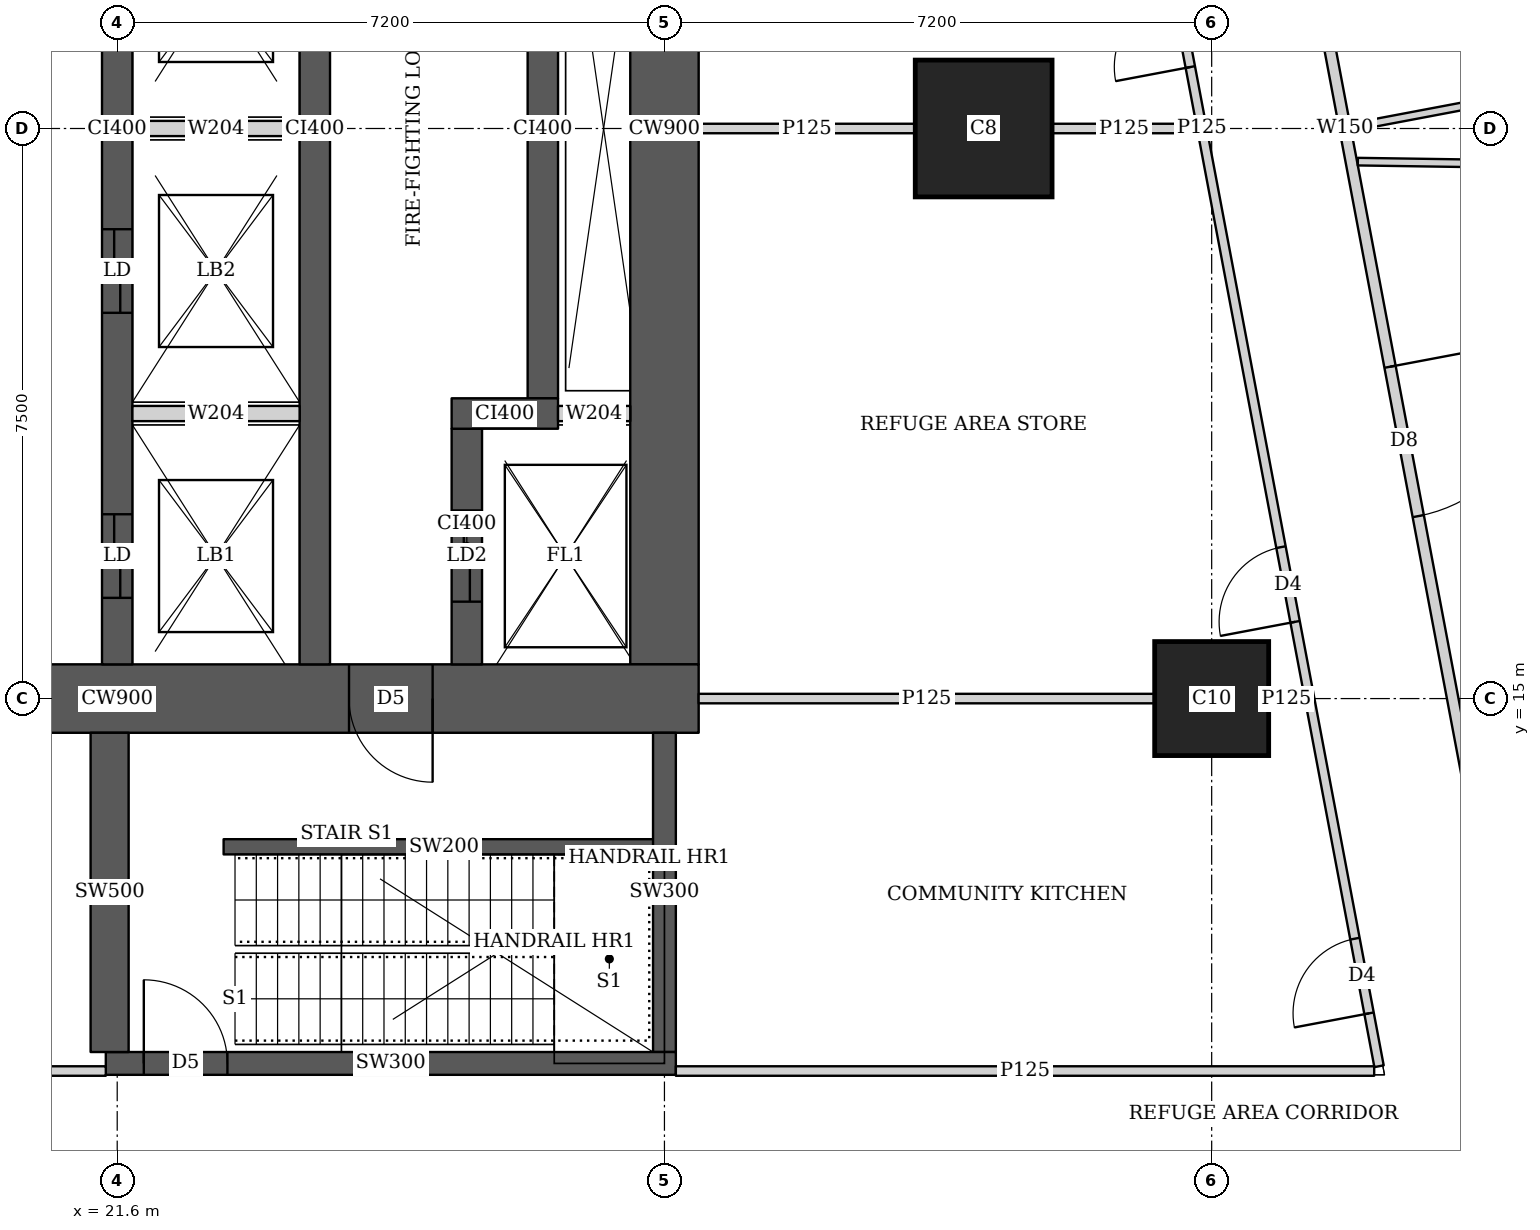
"""IFC4 building model, lengths in metres.
Left out: names, types, materials, properties, quantities, classifications, styles, units other than length and angle.
Written with IfcOpenShell. Run it as: python <this file> out.ifc"""

import sys

from ifc_helpers import new_model, si_unit, direction, frame, frame_2d, origin, origin_2d, place, context, subcontext, project, spatial, rectangle, extrude, element, fill, save


model = new_model("IFC4")
c1 = context("Model", 3, precision=1e-05, world=origin(), true_north=direction((0.0, 1.0)))
c2 = subcontext(c1, "Body", "Model", "MODEL_VIEW")
j1 = project(units=[si_unit("LENGTHUNIT", "METRE"), si_unit("PLANEANGLEUNIT", "RADIAN")], contexts=[c1])
p1 = place(None, origin())
s1 = spatial("IfcSite", under=j1, at=p1, CompositionType="ELEMENT")
p2 = place(p1, origin())
s2 = spatial("IfcBuilding", under=s1, at=p2, CompositionType="ELEMENT")
p3 = place(p2, frame((0.0, 0.0, 188.3)))
s3 = spatial("IfcBuildingStorey", under=s2, at=p3, CompositionType="ELEMENT", Elevation=188.3)
p4 = place(p3, frame((36.0, 15.0, 0.0), z_axis=(0.0, 0.0, 1.0), x_axis=(1.0, 0.0, 0.0)))
e1 = element("IfcColumn", 1, at=p4, inside=s3, PredefinedType="COLUMN", context=c2, shape_type="SweptSolid", body=[
    extrude(rectangle(XDim=1.5, YDim=1.5, at=origin_2d()), origin(), (0.0, 0.0, 1.0), 5.4),
])
p5 = place(p3, frame((33.0, 22.5, 0.0), z_axis=(0.0, 0.0, 1.0), x_axis=(1.0, 0.0, 0.0)))
e2 = element("IfcColumn", 2, at=p5, inside=s3, PredefinedType="COLUMN", context=c2, shape_type="SweptSolid", body=[
    extrude(rectangle(XDim=1.8, YDim=1.8, at=origin_2d()), origin(), (0.0, 0.0, 1.0), 5.4),
])
p6 = place(p3, frame((13.95, 15.0, 0.0), z_axis=(0.0, 0.0, 1.0), x_axis=(1.0, 0.0, 0.0)))
e3 = element("IfcWall", 3, at=p6, inside=s3, PredefinedType="SHEAR", context=c2, shape_type="SweptSolid", body=[
    extrude(rectangle(XDim=15.3, YDim=0.9, at=frame_2d((7.65, 0.0))), origin(), (0.0, 0.0, 1.0), 5.4),
])
p7 = place(p6, frame((4.45, 0.0, 0.0)))
e4 = element("IfcOpeningElement", 4, at=p7, cuts=e3, PredefinedType="OPENING", context=c2, shape_type="SweptSolid", body=[
    extrude(rectangle(XDim=1.8, YDim=2.1, at=frame_2d((0.9, 1.05))), frame((0.0, 0.46, 0.0), z_axis=(0.0, -1.0, 0.0), x_axis=(1.0, 0.0, 0.0)), (0.0, 0.0, 1.0), 0.92),
])
p8 = place(p6, frame((10.7, 0.0, 0.0)))
e5 = element("IfcOpeningElement", 5, at=p8, cuts=e3, PredefinedType="OPENING", context=c2, shape_type="SweptSolid", body=[
    extrude(rectangle(XDim=1.1, YDim=2.1, at=frame_2d((0.55, 1.05))), frame((0.0, 0.46, 0.0), z_axis=(0.0, -1.0, 0.0), x_axis=(1.0, 0.0, 0.0)), (0.0, 0.0, 1.0), 0.92),
])
p9 = place(p3, frame((28.8, 15.45, 0.0), z_axis=(0.0, 0.0, 1.0), x_axis=(0.0, 1.0, 0.0)))
e6 = element("IfcWall", 6, at=p9, inside=s3, PredefinedType="SHEAR", context=c2, shape_type="SweptSolid", body=[
    extrude(rectangle(XDim=14.1, YDim=0.9, at=frame_2d((7.05, 0.0))), origin(), (0.0, 0.0, 1.0), 5.4),
])
p10 = place(p3, frame((21.6, 15.45, 0.0), z_axis=(0.0, 0.0, 1.0), x_axis=(0.0, 1.0, 0.0)))
e7 = element("IfcWall", 7, at=p10, inside=s3, PredefinedType="SHEAR", context=c2, shape_type="SweptSolid", body=[
    extrude(rectangle(XDim=14.1, YDim=0.4, at=frame_2d((7.05, 0.0))), origin(), (0.0, 0.0, 1.0), 5.4),
])
p11 = place(p10, frame((0.875, 0.0, 0.0)))
e8 = element("IfcOpeningElement", 8, at=p11, cuts=e7, PredefinedType="OPENING", context=c2, shape_type="SweptSolid", body=[
    extrude(rectangle(XDim=1.1, YDim=2.1, at=frame_2d((0.55, 1.05))), frame((0.0, 0.21, 0.0), z_axis=(0.0, -1.0, 0.0), x_axis=(1.0, 0.0, 0.0)), (0.0, 0.0, 1.0), 0.42),
])
p12 = place(p10, frame((4.625, 0.0, 0.0)))
e9 = element("IfcOpeningElement", 9, at=p12, cuts=e7, PredefinedType="OPENING", context=c2, shape_type="SweptSolid", body=[
    extrude(rectangle(XDim=1.1, YDim=2.1, at=frame_2d((0.55, 1.05))), frame((0.0, 0.21, 0.0), z_axis=(0.0, -1.0, 0.0), x_axis=(1.0, 0.0, 0.0)), (0.0, 0.0, 1.0), 0.42),
])
p13 = place(p10, frame((8.375, 0.0, 0.0)))
e10 = element("IfcOpeningElement", 10, at=p13, cuts=e7, PredefinedType="OPENING", context=c2, shape_type="SweptSolid", body=[
    extrude(rectangle(XDim=1.1, YDim=2.1, at=frame_2d((0.55, 1.05))), frame((0.0, 0.21, 0.0), z_axis=(0.0, -1.0, 0.0), x_axis=(1.0, 0.0, 0.0)), (0.0, 0.0, 1.0), 0.42),
])
p14 = place(p10, frame((12.125, 0.0, 0.0)))
e11 = element("IfcOpeningElement", 11, at=p14, cuts=e7, PredefinedType="OPENING", context=c2, shape_type="SweptSolid", body=[
    extrude(rectangle(XDim=1.1, YDim=2.1, at=frame_2d((0.55, 1.05))), frame((0.0, 0.21, 0.0), z_axis=(0.0, -1.0, 0.0), x_axis=(1.0, 0.0, 0.0)), (0.0, 0.0, 1.0), 0.42),
])
p15 = place(p3, frame((24.2, 15.45, 0.0), z_axis=(0.0, 0.0, 1.0), x_axis=(0.0, 1.0, 0.0)))
e12 = element("IfcWall", 12, at=p15, inside=s3, PredefinedType="SHEAR", context=c2, shape_type="SweptSolid", body=[
    extrude(rectangle(XDim=14.1, YDim=0.4, at=frame_2d((7.05, 0.0))), origin(), (0.0, 0.0, 1.0), 5.4),
])
p16 = place(p3, frame((26.2, 15.45, 0.0), z_axis=(0.0, 0.0, 1.0), x_axis=(0.0, 1.0, 0.0)))
e13 = element("IfcWall", 13, at=p16, inside=s3, PredefinedType="SHEAR", context=c2, shape_type="SweptSolid", body=[
    extrude(rectangle(XDim=3.1, YDim=0.4, at=frame_2d((1.55, 0.0))), origin(), (0.0, 0.0, 1.0), 5.4),
])
p17 = place(p16, frame((0.825, 0.0, 0.0)))
e14 = element("IfcOpeningElement", 14, at=p17, cuts=e13, PredefinedType="OPENING", context=c2, shape_type="SweptSolid", body=[
    extrude(rectangle(XDim=1.2, YDim=2.1, at=frame_2d((0.6, 1.05))), frame((0.0, 0.21, 0.0), z_axis=(0.0, -1.0, 0.0), x_axis=(1.0, 0.0, 0.0)), (0.0, 0.0, 1.0), 0.42),
])
p18 = place(p3, frame((26.0, 18.75, 0.0), z_axis=(0.0, 0.0, 1.0), x_axis=(1.0, 0.0, 0.0)))
e15 = element("IfcWall", 15, at=p18, inside=s3, PredefinedType="SHEAR", context=c2, shape_type="SweptSolid", body=[
    extrude(rectangle(XDim=1.4, YDim=0.4, at=frame_2d((0.7, 0.0))), origin(), (0.0, 0.0, 1.0), 5.4),
])
p19 = place(p3, frame((27.2, 18.95, 0.0), z_axis=(0.0, 0.0, 1.0), x_axis=(0.0, 1.0, 0.0)))
e16 = element("IfcWall", 16, at=p19, inside=s3, PredefinedType="SHEAR", context=c2, shape_type="SweptSolid", body=[
    extrude(rectangle(XDim=7.1, YDim=0.4, at=frame_2d((3.55, 0.0))), origin(), (0.0, 0.0, 1.0), 5.4),
])
p20 = place(p3, frame((21.45, 10.2, 0.0), z_axis=(0.0, 0.0, 1.0), x_axis=(1.0, 0.0, 0.0)))
e17 = element("IfcWall", 17, at=p20, inside=s3, PredefinedType="SHEAR", context=c2, shape_type="SweptSolid", body=[
    extrude(rectangle(XDim=7.5, YDim=0.3, at=frame_2d((3.75, 0.0))), origin(), (0.0, 0.0, 1.0), 5.4),
])
p21 = place(p20, frame((0.5, 0.0, 0.0)))
e18 = element("IfcOpeningElement", 18, at=p21, cuts=e17, PredefinedType="OPENING", context=c2, shape_type="SweptSolid", body=[
    extrude(rectangle(XDim=1.1, YDim=2.1, at=frame_2d((0.55, 1.05))), frame((0.0, 0.16, 0.0), z_axis=(0.0, -1.0, 0.0), x_axis=(1.0, 0.0, 0.0)), (0.0, 0.0, 1.0), 0.32),
])
p22 = place(p3, frame((21.5, 10.35, 0.0), z_axis=(0.0, 0.0, 1.0), x_axis=(0.0, 1.0, 0.0)))
e19 = element("IfcWall", 19, at=p22, inside=s3, PredefinedType="SHEAR", context=c2, shape_type="SweptSolid", body=[
    extrude(rectangle(XDim=4.2, YDim=0.5, at=frame_2d((2.1, 0.0))), origin(), (0.0, 0.0, 1.0), 5.4),
])
p23 = place(p3, frame((28.8, 10.35, 0.0), z_axis=(0.0, 0.0, 1.0), x_axis=(0.0, 1.0, 0.0)))
e20 = element("IfcWall", 20, at=p23, inside=s3, PredefinedType="SHEAR", context=c2, shape_type="SweptSolid", body=[
    extrude(rectangle(XDim=4.2, YDim=0.3, at=frame_2d((2.1, 0.0))), origin(), (0.0, 0.0, 1.0), 5.4),
])
p24 = place(p3, frame((33.384, 45.638, 0.0), z_axis=(0.0, 0.0, 1.0), x_axis=(0.185609889355, -0.982623513342, 0.0)))
e21 = element("IfcWall", 21, at=p24, inside=s3, PredefinedType="SOLIDWALL", context=c2, shape_type="SweptSolid", body=[
    extrude(rectangle(XDim=47.093, YDim=0.15, at=frame_2d((23.547, 0.0))), origin(), (0.0, 0.0, 1.0), 3.35),
])
p25 = place(p24, frame((11.166, 0.0, 0.0)))
e22 = element("IfcOpeningElement", 22, at=p25, cuts=e21, PredefinedType="OPENING", context=c2, shape_type="SweptSolid", body=[
    extrude(rectangle(XDim=1.0, YDim=2.1, at=frame_2d((0.5, 1.05))), frame((0.0, 0.085, 0.0), z_axis=(0.0, -1.0, 0.0), x_axis=(1.0, 0.0, 0.0)), (0.0, 0.0, 1.0), 0.17),
])
p26 = place(p24, frame((26.737, 0.0, 0.0)))
e23 = element("IfcOpeningElement", 23, at=p26, cuts=e21, PredefinedType="OPENING", context=c2, shape_type="SweptSolid", body=[
    extrude(rectangle(XDim=2.0, YDim=2.1, at=frame_2d((1.0, 1.05))), frame((0.0, 0.085, 0.0), z_axis=(0.0, -1.0, 0.0), x_axis=(1.0, 0.0, 0.0)), (0.0, 0.0, 1.0), 0.17),
])
p27 = place(p24, frame((34.058, 0.0, 0.0)))
e24 = element("IfcOpeningElement", 24, at=p27, cuts=e21, PredefinedType="OPENING", context=c2, shape_type="SweptSolid", body=[
    extrude(rectangle(XDim=2.0, YDim=2.1, at=frame_2d((1.0, 1.05))), frame((0.0, 0.085, 0.0), z_axis=(0.0, -1.0, 0.0), x_axis=(1.0, 0.0, 0.0)), (0.0, 0.0, 1.0), 0.17),
])
p28 = place(p3, frame((42.887, 23.47, 0.0), z_axis=(0.0, 0.0, 1.0), x_axis=(-0.982608146753, -0.185691222019, 0.0)))
e25 = element("IfcWall", 25, at=p28, inside=s3, PredefinedType="PARTITIONING", context=c2, shape_type="SweptSolid", body=[
    extrude(rectangle(XDim=5.149, YDim=0.1, at=frame_2d((2.574, 0.0))), origin(), (0.0, 0.0, 1.0), 3.55),
])
p29 = place(p3, frame((10.163, 10.1, 0.0), z_axis=(0.0, 0.0, 1.0), x_axis=(1.0, 0.0, 0.0)))
e26 = element("IfcWall", 26, at=p29, inside=s3, PredefinedType="PARTITIONING", context=c2, shape_type="SweptSolid", body=[
    extrude(rectangle(XDim=11.287, YDim=0.125, at=frame_2d((5.644, 0.0))), origin(), (0.0, 0.0, 1.0), 3.15),
])
p30 = place(p29, frame((7.832, 0.0, 0.0)))
e27 = element("IfcOpeningElement", 27, at=p30, cuts=e26, PredefinedType="OPENING", context=c2, shape_type="SweptSolid", body=[
    extrude(rectangle(XDim=1.8, YDim=2.1, at=frame_2d((0.9, 1.05))), frame((0.0, 0.073, 0.0), z_axis=(0.0, -1.0, 0.0), x_axis=(1.0, 0.0, 0.0)), (0.0, 0.0, 1.0), 0.145),
])
p31 = place(p3, frame((28.95, 10.1, 0.0), z_axis=(0.0, 0.0, 1.0), x_axis=(1.0, 0.0, 0.0)))
e28 = element("IfcWall", 28, at=p31, inside=s3, PredefinedType="PARTITIONING", context=c2, shape_type="SweptSolid", body=[
    extrude(rectangle(XDim=9.188, YDim=0.125, at=frame_2d((4.594, 0.0))), origin(), (0.0, 0.0, 1.0), 3.15),
])
p32 = place(p3, frame((38.202, 10.163, 0.0), z_axis=(0.0, 0.0, 1.0), x_axis=(-0.185610321132, 0.982623431783, 0.0)))
e29 = element("IfcWall", 29, at=p32, inside=s3, PredefinedType="PARTITIONING", context=c2, shape_type="SweptSolid", body=[
    extrude(rectangle(XDim=25.111, YDim=0.125, at=frame_2d((12.556, 0.0))), origin(), (0.0, 0.0, 1.0), 3.55),
])
p33 = place(p32, frame((0.708, 0.0, 0.0)))
e30 = element("IfcOpeningElement", 30, at=p33, cuts=e29, PredefinedType="OPENING", context=c2, shape_type="SweptSolid", body=[
    extrude(rectangle(XDim=1.0, YDim=2.1, at=frame_2d((0.5, 1.05))), frame((0.0, 0.073, 0.0), z_axis=(0.0, -1.0, 0.0), x_axis=(1.0, 0.0, 0.0)), (0.0, 0.0, 1.0), 0.145),
])
p34 = place(p32, frame((5.95, 0.0, 0.0)))
e31 = element("IfcOpeningElement", 31, at=p34, cuts=e29, PredefinedType="OPENING", context=c2, shape_type="SweptSolid", body=[
    extrude(rectangle(XDim=1.0, YDim=2.1, at=frame_2d((0.5, 1.05))), frame((0.0, 0.073, 0.0), z_axis=(0.0, -1.0, 0.0), x_axis=(1.0, 0.0, 0.0)), (0.0, 0.0, 1.0), 0.145),
])
p35 = place(p32, frame((13.378, 0.0, 0.0)))
e32 = element("IfcOpeningElement", 32, at=p35, cuts=e29, PredefinedType="OPENING", context=c2, shape_type="SweptSolid", body=[
    extrude(rectangle(XDim=1.0, YDim=2.1, at=frame_2d((0.5, 1.05))), frame((0.0, 0.073, 0.0), z_axis=(0.0, -1.0, 0.0), x_axis=(1.0, 0.0, 0.0)), (0.0, 0.0, 1.0), 0.145),
])
p36 = place(p32, frame((21.2, 0.0, 0.0)))
e33 = element("IfcOpeningElement", 33, at=p36, cuts=e29, PredefinedType="OPENING", context=c2, shape_type="SweptSolid", body=[
    extrude(rectangle(XDim=1.0, YDim=2.1, at=frame_2d((0.5, 1.05))), frame((0.0, 0.073, 0.0), z_axis=(0.0, -1.0, 0.0), x_axis=(1.0, 0.0, 0.0)), (0.0, 0.0, 1.0), 0.145),
])
p37 = place(p3, frame((29.25, 15.0, 0.0), z_axis=(0.0, 0.0, 1.0), x_axis=(1.0, 0.0, 0.0)))
e34 = element("IfcWall", 34, at=p37, inside=s3, PredefinedType="PARTITIONING", context=c2, shape_type="SweptSolid", body=[
    extrude(rectangle(XDim=5.999, YDim=0.125, at=frame_2d((3.0, 0.0))), origin(), (0.0, 0.0, 1.0), 3.55),
])
p38 = place(p3, frame((36.751, 15.0, 0.0), z_axis=(0.0, 0.0, 1.0), x_axis=(1.0, 0.0, 0.0)))
e35 = element("IfcWall", 35, at=p38, inside=s3, PredefinedType="PARTITIONING", context=c2, shape_type="SweptSolid", body=[
    extrude(rectangle(XDim=0.462, YDim=0.125, at=frame_2d((0.231, 0.0))), origin(), (0.0, 0.0, 1.0), 3.55),
])
p39 = place(p3, frame((29.25, 22.5, 0.0), z_axis=(0.0, 0.0, 1.0), x_axis=(1.0, 0.0, 0.0)))
e36 = element("IfcWall", 36, at=p39, inside=s3, PredefinedType="PARTITIONING", context=c2, shape_type="SweptSolid", body=[
    extrude(rectangle(XDim=2.849, YDim=0.125, at=frame_2d((1.425, 0.0))), origin(), (0.0, 0.0, 1.0), 3.55),
])
p40 = place(p3, frame((33.901, 22.5, 0.0), z_axis=(0.0, 0.0, 1.0), x_axis=(1.0, 0.0, 0.0)))
e37 = element("IfcWall", 37, at=p40, inside=s3, PredefinedType="PARTITIONING", context=c2, shape_type="SweptSolid", body=[
    extrude(rectangle(XDim=1.895, YDim=0.125, at=frame_2d((0.948, 0.0))), origin(), (0.0, 0.0, 1.0), 3.55),
])
p41 = place(p3, frame((37.923, 22.064, 0.0), z_axis=(0.0, 0.0, 1.0), x_axis=(0.99989012089, -0.014823837076, 0.0)))
e38 = element("IfcWall", 38, at=p41, inside=s3, PredefinedType="PARTITIONING", context=c2, shape_type="SweptSolid", body=[
    extrude(rectangle(XDim=4.924, YDim=0.1, at=frame_2d((2.462, 0.0))), origin(), (0.0, 0.0, 1.0), 3.55),
])
p42 = place(p3, frame((23.0, 13.05, 0.0), z_axis=(0.0, 0.0, 1.0), x_axis=(1.0, 0.0, 0.0)))
e39 = element("IfcWall", 39, at=p42, inside=s3, PredefinedType="SHEAR", context=c2, shape_type="SweptSolid", body=[
    extrude(rectangle(XDim=5.8, YDim=0.2, at=frame_2d((2.9, 0.0))), origin(), (0.0, 0.0, 1.0), 5.4),
])
for number, where, z_axis, x_axis in (
    (40, (21.8, 18.75, 0.0), (0.0, 0.0, 1.0), (1.0, 0.0, 0.0)),
    (41, (21.8, 22.5, 0.0), (0.0, 0.0, 1.0), (1.0, 0.0, 0.0)),
):
    element("IfcWall", number, at=place(p3, frame(where, z_axis=z_axis, x_axis=x_axis)), inside=s3, PredefinedType="SOLIDWALL", context=c2, shape_type="SweptSolid", body=[
        extrude(rectangle(XDim=2.2, YDim=0.2, at=frame_2d((1.1, 0.0))), origin(), (0.0, 0.0, 1.0), 5.15),
    ])
p43 = place(p3, frame((27.4, 18.75, 0.0), z_axis=(0.0, 0.0, 1.0), x_axis=(1.0, 0.0, 0.0)))
e42 = element("IfcWall", 42, at=p43, inside=s3, PredefinedType="SOLIDWALL", context=c2, shape_type="SweptSolid", body=[
    extrude(rectangle(XDim=0.95, YDim=0.2, at=frame_2d((0.475, 0.0))), origin(), (0.0, 0.0, 1.0), 5.15),
])
p44 = place(p26, origin())
e43 = element("IfcDoor", 43, at=p44, inside=s3, OperationType="DOUBLE_DOOR_SINGLE_SWING", PredefinedType="DOOR", context=c2, shape_type="SweptSolid", body=[
    extrude(rectangle(XDim=2.0, YDim=2.1, at=frame_2d((1.0, 1.05))), frame((0.0, 0.025, 0.0), z_axis=(0.0, -1.0, 0.0), x_axis=(1.0, 0.0, 0.0)), (0.0, 0.0, 1.0), 0.05),
])
fill(e23, e43)
p45 = place(p33, origin())
e44 = element("IfcDoor", 44, at=p45, inside=s3, OperationType="SINGLE_SWING_LEFT", PredefinedType="DOOR", context=c2, shape_type="SweptSolid", body=[
    extrude(rectangle(XDim=1.0, YDim=2.1, at=frame_2d((0.5, 1.05))), frame((0.0, 0.025, 0.0), z_axis=(0.0, -1.0, 0.0), x_axis=(1.0, 0.0, 0.0)), (0.0, 0.0, 1.0), 0.05),
])
fill(e30, e44)
p46 = place(p34, origin())
e45 = element("IfcDoor", 45, at=p46, inside=s3, OperationType="SINGLE_SWING_LEFT", PredefinedType="DOOR", context=c2, shape_type="SweptSolid", body=[
    extrude(rectangle(XDim=1.0, YDim=2.1, at=frame_2d((0.5, 1.05))), frame((0.0, 0.025, 0.0), z_axis=(0.0, -1.0, 0.0), x_axis=(1.0, 0.0, 0.0)), (0.0, 0.0, 1.0), 0.05),
])
fill(e31, e45)
p47 = place(p35, origin())
e46 = element("IfcDoor", 46, at=p47, inside=s3, OperationType="SINGLE_SWING_LEFT", PredefinedType="DOOR", context=c2, shape_type="SweptSolid", body=[
    extrude(rectangle(XDim=1.0, YDim=2.1, at=frame_2d((0.5, 1.05))), frame((0.0, 0.025, 0.0), z_axis=(0.0, -1.0, 0.0), x_axis=(1.0, 0.0, 0.0)), (0.0, 0.0, 1.0), 0.05),
])
fill(e32, e46)
p48 = place(p8, origin())
e47 = element("IfcDoor", 47, at=p48, inside=s3, OperationType="SINGLE_SWING_LEFT", PredefinedType="DOOR", context=c2, shape_type="SweptSolid", body=[
    extrude(rectangle(XDim=1.1, YDim=2.1, at=frame_2d((0.55, 1.05))), frame((0.0, 0.025, 0.0), z_axis=(0.0, -1.0, 0.0), x_axis=(1.0, 0.0, 0.0)), (0.0, 0.0, 1.0), 0.05),
])
fill(e5, e47)
p49 = place(p17, origin())
e48 = element("IfcDoor", 48, at=p49, inside=s3, OperationType="DOUBLE_DOOR_SLIDING", PredefinedType="DOOR", context=c2, shape_type="SweptSolid", body=[
    extrude(rectangle(XDim=1.2, YDim=2.1, at=frame_2d((0.6, 1.05))), frame((0.0, 0.025, 0.0), z_axis=(0.0, -1.0, 0.0), x_axis=(1.0, 0.0, 0.0)), (0.0, 0.0, 1.0), 0.05),
])
fill(e14, e48)
p50 = place(p11, origin())
e49 = element("IfcDoor", 49, at=p50, inside=s3, OperationType="DOUBLE_DOOR_SLIDING", PredefinedType="DOOR", context=c2, shape_type="SweptSolid", body=[
    extrude(rectangle(XDim=1.1, YDim=2.1, at=frame_2d((0.55, 1.05))), frame((0.0, 0.025, 0.0), z_axis=(0.0, -1.0, 0.0), x_axis=(1.0, 0.0, 0.0)), (0.0, 0.0, 1.0), 0.05),
])
fill(e8, e49)
p51 = place(p12, origin())
e50 = element("IfcDoor", 50, at=p51, inside=s3, OperationType="DOUBLE_DOOR_SLIDING", PredefinedType="DOOR", context=c2, shape_type="SweptSolid", body=[
    extrude(rectangle(XDim=1.1, YDim=2.1, at=frame_2d((0.55, 1.05))), frame((0.0, 0.025, 0.0), z_axis=(0.0, -1.0, 0.0), x_axis=(1.0, 0.0, 0.0)), (0.0, 0.0, 1.0), 0.05),
])
fill(e9, e50)
p52 = place(p21, origin())
e51 = element("IfcDoor", 51, at=p52, inside=s3, OperationType="SINGLE_SWING_LEFT", PredefinedType="DOOR", context=c2, shape_type="SweptSolid", body=[
    extrude(rectangle(XDim=1.1, YDim=2.1, at=frame_2d((0.55, 1.05))), frame((0.0, 0.025, 0.0), z_axis=(0.0, -1.0, 0.0), x_axis=(1.0, 0.0, 0.0)), (0.0, 0.0, 1.0), 0.05),
])
fill(e18, e51)
save(model, sys.argv[1])
